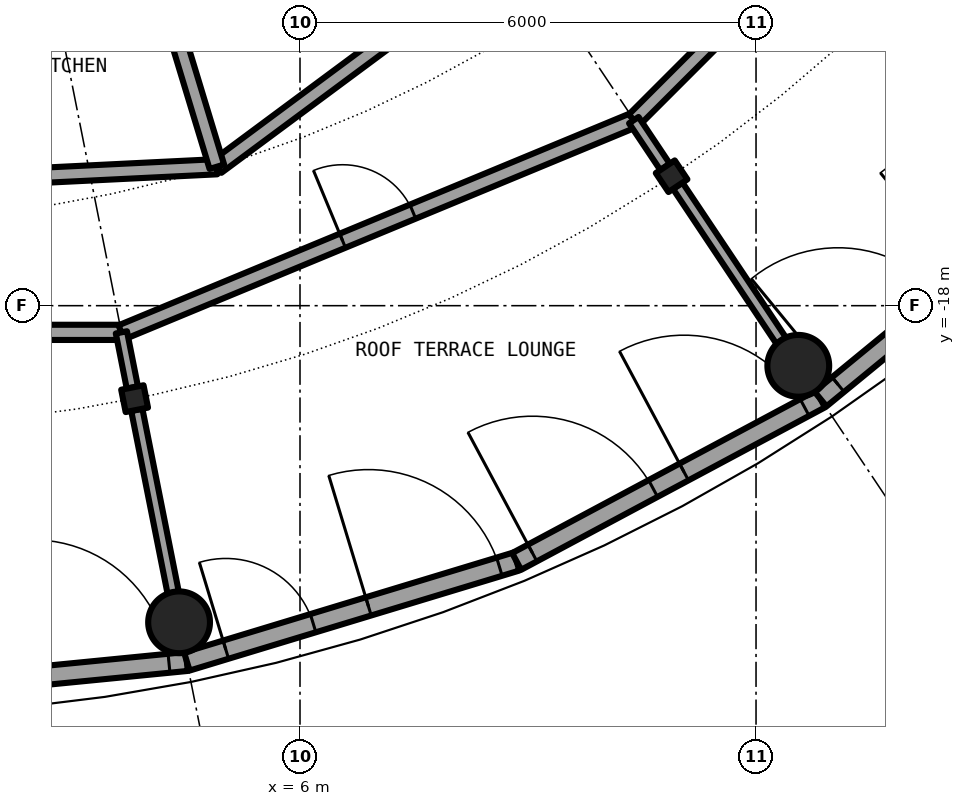
"""IFC4 building model, lengths in metres.
Left out: names, types, materials, properties, quantities, classifications, styles, units other than length and angle.
Written with IfcOpenShell. Run it as: python <this file> out.ifc"""

import sys

from ifc_helpers import new_model, si_unit, direction, frame, frame_2d, origin, origin_2d, place, context, subcontext, project, spatial, rectangle, hollow_circle, i_section, extrude, element, fill, save


model = new_model("IFC4")
c1 = context("Model", 3, precision=1e-05, world=origin(), true_north=direction((0.0, 1.0)))
c2 = subcontext(c1, "Body", "Model", "MODEL_VIEW")
j1 = project(units=[si_unit("LENGTHUNIT", "METRE"), si_unit("PLANEANGLEUNIT", "RADIAN")], contexts=[c1])
p1 = place(None, origin())
s1 = spatial("IfcSite", under=j1, at=p1, CompositionType="ELEMENT")
p2 = place(p1, origin())
s2 = spatial("IfcBuilding", under=s1, at=p2, CompositionType="ELEMENT")
p3 = place(p2, frame((0.0, 0.0, 249.3)))
s3 = spatial("IfcBuildingStorey", under=s2, at=p3, CompositionType="ELEMENT", Elevation=249.3)
for number, where, z_axis, x_axis in (
    (1, (4.409, -22.166, 0.0), (0.0, 0.0, 1.0), (1.0, 0.0, 0.0)),
    (2, (12.556, -18.791, 0.0), (0.0, 0.0, 1.0), (1.0, 0.0, 0.0)),
):
    element("IfcColumn", number, at=place(p3, frame(where, z_axis=z_axis, x_axis=x_axis)), inside=s3, PredefinedType="COLUMN", context=c2, shape_type="SweptSolid", body=[
        extrude(hollow_circle(Radius=0.406, WallThickness=0.03, at=origin_2d()), origin(), (0.0, 0.0, 1.0), 3.05),
    ])
for number, where, z_axis, x_axis in (
    (3, (3.824, -19.223, 0.0), (0.0, 0.0, 1.0), (0.195, -0.981, 0.0)),
    (4, (10.889, -16.297, 0.0), (0.0, 0.0, 1.0), (0.556, -0.831, 0.0)),
):
    element("IfcColumn", number, at=place(p3, frame(where, z_axis=z_axis, x_axis=x_axis)), inside=s3, PredefinedType="COLUMN", context=c2, shape_type="SweptSolid", body=[
        extrude(i_section(OverallWidth=0.3, OverallDepth=0.3, WebThickness=0.011, FlangeThickness=0.019, FilletRadius=0.027, at=origin_2d()), origin(), (0.0, 0.0, 1.0), 3.05),
    ])
p4 = place(p3, frame((0.0, -23.125, 0.0), z_axis=(0.0, 0.0, 1.0), x_axis=(0.995189063612, 0.097973096645, 0.0)))
e5 = element("IfcWall", 5, at=p4, inside=s3, PredefinedType="SOLIDWALL", context=c2, shape_type="SweptSolid", body=[
    extrude(rectangle(XDim=4.533, YDim=0.25, at=frame_2d((2.266, 0.0))), origin(), (0.0, 0.0, 1.0), 2.7),
])
p5 = place(p4, frame((0.236, 0.0, 0.0)))
e6 = element("IfcOpeningElement", 6, at=p5, cuts=e5, PredefinedType="OPENING", context=c2, shape_type="SweptSolid", body=[
    extrude(rectangle(XDim=1.8, YDim=2.2, at=frame_2d((0.9, 1.1))), frame((0.0, 0.135, 0.0), z_axis=(0.0, -1.0, 0.0), x_axis=(1.0, 0.0, 0.0)), (0.0, 0.0, 1.0), 0.27),
])
p6 = place(p4, frame((2.497, 0.0, 0.0)))
e7 = element("IfcOpeningElement", 7, at=p6, cuts=e5, PredefinedType="OPENING", context=c2, shape_type="SweptSolid", body=[
    extrude(rectangle(XDim=1.8, YDim=2.2, at=frame_2d((0.9, 1.1))), frame((0.0, 0.135, 0.0), z_axis=(0.0, -1.0, 0.0), x_axis=(1.0, 0.0, 0.0)), (0.0, 0.0, 1.0), 0.27),
])
p7 = place(p3, frame((4.511, -22.681, 0.0), z_axis=(0.0, 0.0, 1.0), x_axis=(0.956960982965, 0.290216603735, 0.0)))
e8 = element("IfcWall", 8, at=p7, inside=s3, PredefinedType="SOLIDWALL", context=c2, shape_type="SweptSolid", body=[
    extrude(rectangle(XDim=4.534, YDim=0.25, at=frame_2d((2.267, 0.0))), origin(), (0.0, 0.0, 1.0), 2.7),
])
p8 = place(p7, frame((0.536, 0.0, 0.0)))
e9 = element("IfcOpeningElement", 9, at=p8, cuts=e8, PredefinedType="OPENING", context=c2, shape_type="SweptSolid", body=[
    extrude(rectangle(XDim=1.2, YDim=2.2, at=frame_2d((0.6, 1.1))), frame((0.0, 0.135, 0.0), z_axis=(0.0, -1.0, 0.0), x_axis=(1.0, 0.0, 0.0)), (0.0, 0.0, 1.0), 0.27),
])
p9 = place(p7, frame((2.497, 0.0, 0.0)))
e10 = element("IfcOpeningElement", 10, at=p9, cuts=e8, PredefinedType="OPENING", context=c2, shape_type="SweptSolid", body=[
    extrude(rectangle(XDim=1.8, YDim=2.2, at=frame_2d((0.9, 1.1))), frame((0.0, 0.135, 0.0), z_axis=(0.0, -1.0, 0.0), x_axis=(1.0, 0.0, 0.0)), (0.0, 0.0, 1.0), 0.27),
])
p10 = place(p3, frame((8.85, -21.365, 0.0), z_axis=(0.0, 0.0, 1.0), x_axis=(0.881912752543, 0.471412660947, 0.0)))
e11 = element("IfcWall", 11, at=p10, inside=s3, PredefinedType="SOLIDWALL", context=c2, shape_type="SweptSolid", body=[
    extrude(rectangle(XDim=4.533, YDim=0.25, at=frame_2d((2.267, 0.0))), origin(), (0.0, 0.0, 1.0), 2.7),
])
p11 = place(p10, frame((0.236, 0.0, 0.0)))
e12 = element("IfcOpeningElement", 12, at=p11, cuts=e11, PredefinedType="OPENING", context=c2, shape_type="SweptSolid", body=[
    extrude(rectangle(XDim=1.8, YDim=2.2, at=frame_2d((0.9, 1.1))), frame((0.0, 0.135, 0.0), z_axis=(0.0, -1.0, 0.0), x_axis=(1.0, 0.0, 0.0)), (0.0, 0.0, 1.0), 0.27),
])
p12 = place(p10, frame((2.497, 0.0, 0.0)))
e13 = element("IfcOpeningElement", 13, at=p12, cuts=e11, PredefinedType="OPENING", context=c2, shape_type="SweptSolid", body=[
    extrude(rectangle(XDim=1.8, YDim=2.2, at=frame_2d((0.9, 1.1))), frame((0.0, 0.135, 0.0), z_axis=(0.0, -1.0, 0.0), x_axis=(1.0, 0.0, 0.0)), (0.0, 0.0, 1.0), 0.27),
])
p13 = place(p3, frame((12.848, -19.228, 0.0), z_axis=(0.0, 0.0, 1.0), x_axis=(0.772989395532, 0.634418942337, 0.0)))
e14 = element("IfcWall", 14, at=p13, inside=s3, PredefinedType="SOLIDWALL", context=c2, shape_type="SweptSolid", body=[
    extrude(rectangle(XDim=4.533, YDim=0.25, at=frame_2d((2.267, 0.0))), origin(), (0.0, 0.0, 1.0), 2.7),
])
p14 = place(p13, frame((0.3, 0.0, 0.0)))
e15 = element("IfcOpeningElement", 15, at=p14, cuts=e14, PredefinedType="OPENING", context=c2, shape_type="SweptSolid", body=[
    extrude(rectangle(XDim=1.8, YDim=2.2, at=frame_2d((0.9, 1.1))), frame((0.0, 0.135, 0.0), z_axis=(0.0, -1.0, 0.0), x_axis=(1.0, 0.0, 0.0)), (0.0, 0.0, 1.0), 0.27),
])
p15 = place(p13, frame((2.497, 0.0, 0.0)))
e16 = element("IfcOpeningElement", 16, at=p15, cuts=e14, PredefinedType="OPENING", context=c2, shape_type="SweptSolid", body=[
    extrude(rectangle(XDim=1.8, YDim=2.2, at=frame_2d((0.9, 1.1))), frame((0.0, 0.135, 0.0), z_axis=(0.0, -1.0, 0.0), x_axis=(1.0, 0.0, 0.0)), (0.0, 0.0, 1.0), 0.27),
])
p16 = place(p3, frame((-3.65, -18.351, 0.0), z_axis=(0.0, 0.0, 1.0), x_axis=(1.0, 0.0, 0.0)))
e17 = element("IfcWall", 17, at=p16, inside=s3, PredefinedType="PARTITIONING", context=c2, shape_type="SweptSolid", body=[
    extrude(rectangle(XDim=7.3, YDim=0.2, at=frame_2d((3.65, 0.0))), origin(), (0.0, 0.0, 1.0), 2.7),
])
p17 = place(p16, frame((3.15, 0.0, 0.0)))
e18 = element("IfcOpeningElement", 18, at=p17, cuts=e17, PredefinedType="OPENING", context=c2, shape_type="SweptSolid", body=[
    extrude(rectangle(XDim=1.0, YDim=2.3, at=frame_2d((0.5, 1.15))), frame((0.0, 0.11, 0.0), z_axis=(0.0, -1.0, 0.0), x_axis=(1.0, 0.0, 0.0)), (0.0, 0.0, 1.0), 0.22),
])
p18 = place(p3, frame((3.65, -18.351, 0.0), z_axis=(0.0, 0.0, 1.0), x_axis=(0.923866436038, 0.382715048518, 0.0)))
e19 = element("IfcWall", 19, at=p18, inside=s3, PredefinedType="PARTITIONING", context=c2, shape_type="SweptSolid", body=[
    extrude(rectangle(XDim=7.301, YDim=0.2, at=frame_2d((3.65, 0.0))), origin(), (0.0, 0.0, 1.0), 2.7),
])
p19 = place(p18, frame((3.15, 0.0, 0.0)))
e20 = element("IfcOpeningElement", 20, at=p19, cuts=e19, PredefinedType="OPENING", context=c2, shape_type="SweptSolid", body=[
    extrude(rectangle(XDim=1.0, YDim=2.3, at=frame_2d((0.5, 1.15))), frame((0.0, 0.11, 0.0), z_axis=(0.0, -1.0, 0.0), x_axis=(1.0, 0.0, 0.0)), (0.0, 0.0, 1.0), 0.22),
])
p20 = place(p3, frame((10.395, -15.557, 0.0), z_axis=(0.0, 0.0, 1.0), x_axis=(0.707106781187, 0.707106781187, 0.0)))
e21 = element("IfcWall", 21, at=p20, inside=s3, PredefinedType="PARTITIONING", context=c2, shape_type="SweptSolid", body=[
    extrude(rectangle(XDim=7.3, YDim=0.2, at=frame_2d((3.65, 0.0))), origin(), (0.0, 0.0, 1.0), 2.7),
])
p21 = place(p20, frame((3.15, 0.0, 0.0)))
e22 = element("IfcOpeningElement", 22, at=p21, cuts=e21, PredefinedType="OPENING", context=c2, shape_type="SweptSolid", body=[
    extrude(rectangle(XDim=1.0, YDim=2.3, at=frame_2d((0.5, 1.15))), frame((0.0, 0.11, 0.0), z_axis=(0.0, -1.0, 0.0), x_axis=(1.0, 0.0, 0.0)), (0.0, 0.0, 1.0), 0.22),
])
p22 = place(p3, frame((-3.297, -16.575, 0.0), z_axis=(0.0, 0.0, 1.0), x_axis=(0.998796706656, 0.0490422142, 0.0)))
e23 = element("IfcWall", 23, at=p22, inside=s3, PredefinedType="PARTITIONING", context=c2, shape_type="SweptSolid", body=[
    extrude(rectangle(XDim=8.214, YDim=0.2, at=frame_2d((4.107, 0.0))), origin(), (0.0, 0.0, 1.0), 2.7),
])
p23 = place(p22, frame((3.614, 0.0, 0.0)))
e24 = element("IfcOpeningElement", 24, at=p23, cuts=e23, PredefinedType="OPENING", context=c2, shape_type="SweptSolid", body=[
    extrude(rectangle(XDim=1.0, YDim=2.3, at=frame_2d((0.5, 1.15))), frame((0.0, 0.11, 0.0), z_axis=(0.0, -1.0, 0.0), x_axis=(1.0, 0.0, 0.0)), (0.0, 0.0, 1.0), 0.22),
])
p24 = place(p3, frame((4.906, -16.172, 0.0), z_axis=(0.0, 0.0, 1.0), x_axis=(0.803204584823, 0.59570327758, 0.0)))
e25 = element("IfcWall", 25, at=p24, inside=s3, PredefinedType="PARTITIONING", context=c2, shape_type="SweptSolid", body=[
    extrude(rectangle(XDim=11.387, YDim=0.2, at=frame_2d((5.693, 0.0))), origin(), (0.0, 0.0, 1.0), 2.7),
])
p25 = place(p24, frame((4.38, 0.0, 0.0)))
e26 = element("IfcOpeningElement", 26, at=p25, cuts=e25, PredefinedType="OPENING", context=c2, shape_type="SweptSolid", body=[
    extrude(rectangle(XDim=1.0, YDim=2.3, at=frame_2d((0.5, 1.15))), frame((0.0, 0.11, 0.0), z_axis=(0.0, -1.0, 0.0), x_axis=(1.0, 0.0, 0.0)), (0.0, 0.0, 1.0), 0.22),
])
p26 = place(p3, frame((2.24, -7.388, 0.0), z_axis=(0.0, 0.0, 1.0), x_axis=(0.290420725025, -0.956899055531, 0.0)))
e27 = element("IfcWall", 27, at=p26, inside=s3, PredefinedType="PARTITIONING", context=c2, shape_type="SweptSolid", body=[
    extrude(rectangle(XDim=9.18, YDim=0.2, at=frame_2d((4.59, 0.0))), origin(), (0.0, 0.0, 1.0), 2.7),
])
p27 = place(p3, frame((3.65, -18.351, 0.0), z_axis=(0.0, 0.0, 1.0), x_axis=(0.194908923467, -0.98082134538, 0.0)))
e28 = element("IfcWall", 28, at=p27, inside=s3, PredefinedType="PARTITIONING", context=c2, shape_type="SweptSolid", body=[
    extrude(rectangle(XDim=0.739, YDim=0.15, at=frame_2d((0.37, 0.0))), origin(), (0.0, 0.0, 1.0), 2.7),
])
p28 = place(p3, frame((3.853, -19.371, 0.0), z_axis=(0.0, 0.0, 1.0), x_axis=(0.195043256877, -0.980794641068, 0.0)))
e29 = element("IfcWall", 29, at=p28, inside=s3, PredefinedType="PARTITIONING", context=c2, shape_type="SweptSolid", body=[
    extrude(rectangle(XDim=2.451, YDim=0.15, at=frame_2d((1.226, 0.0))), origin(), (0.0, 0.0, 1.0), 2.7),
])
p29 = place(p3, frame((10.392, -15.559, 0.0), z_axis=(0.0, 0.0, 1.0), x_axis=(0.555537830231, -0.831491262241, 0.0)))
e30 = element("IfcWall", 30, at=p29, inside=s3, PredefinedType="PARTITIONING", context=c2, shape_type="SweptSolid", body=[
    extrude(rectangle(XDim=0.74, YDim=0.15, at=frame_2d((0.37, 0.0))), origin(), (0.0, 0.0, 1.0), 2.7),
])
p30 = place(p3, frame((10.97, -16.423, 0.0), z_axis=(0.0, 0.0, 1.0), x_axis=(0.555504160879, -0.831513756498, 0.0)))
e31 = element("IfcWall", 31, at=p30, inside=s3, PredefinedType="PARTITIONING", context=c2, shape_type="SweptSolid", body=[
    extrude(rectangle(XDim=2.452, YDim=0.15, at=frame_2d((1.226, 0.0))), origin(), (0.0, 0.0, 1.0), 2.7),
])
p31 = place(p6, origin())
e32 = element("IfcDoor", 32, at=p31, inside=s3, OperationType="SINGLE_SWING_LEFT", PredefinedType="DOOR", context=c2, shape_type="SweptSolid", body=[
    extrude(rectangle(XDim=1.8, YDim=2.2, at=frame_2d((0.9, 1.1))), frame((0.0, 0.025, 0.0), z_axis=(0.0, -1.0, 0.0), x_axis=(1.0, 0.0, 0.0)), (0.0, 0.0, 1.0), 0.05),
])
fill(e7, e32)
p32 = place(p8, origin())
e33 = element("IfcDoor", 33, at=p32, inside=s3, OperationType="SINGLE_SWING_LEFT", PredefinedType="DOOR", context=c2, shape_type="SweptSolid", body=[
    extrude(rectangle(XDim=1.2, YDim=2.2, at=frame_2d((0.6, 1.1))), frame((0.0, 0.025, 0.0), z_axis=(0.0, -1.0, 0.0), x_axis=(1.0, 0.0, 0.0)), (0.0, 0.0, 1.0), 0.05),
])
fill(e9, e33)
p33 = place(p9, origin())
e34 = element("IfcDoor", 34, at=p33, inside=s3, OperationType="SINGLE_SWING_LEFT", PredefinedType="DOOR", context=c2, shape_type="SweptSolid", body=[
    extrude(rectangle(XDim=1.8, YDim=2.2, at=frame_2d((0.9, 1.1))), frame((0.0, 0.025, 0.0), z_axis=(0.0, -1.0, 0.0), x_axis=(1.0, 0.0, 0.0)), (0.0, 0.0, 1.0), 0.05),
])
fill(e10, e34)
p34 = place(p11, origin())
e35 = element("IfcDoor", 35, at=p34, inside=s3, OperationType="SINGLE_SWING_LEFT", PredefinedType="DOOR", context=c2, shape_type="SweptSolid", body=[
    extrude(rectangle(XDim=1.8, YDim=2.2, at=frame_2d((0.9, 1.1))), frame((0.0, 0.025, 0.0), z_axis=(0.0, -1.0, 0.0), x_axis=(1.0, 0.0, 0.0)), (0.0, 0.0, 1.0), 0.05),
])
fill(e12, e35)
p35 = place(p12, origin())
e36 = element("IfcDoor", 36, at=p35, inside=s3, OperationType="SINGLE_SWING_LEFT", PredefinedType="DOOR", context=c2, shape_type="SweptSolid", body=[
    extrude(rectangle(XDim=1.8, YDim=2.2, at=frame_2d((0.9, 1.1))), frame((0.0, 0.025, 0.0), z_axis=(0.0, -1.0, 0.0), x_axis=(1.0, 0.0, 0.0)), (0.0, 0.0, 1.0), 0.05),
])
fill(e13, e36)
p36 = place(p14, origin())
e37 = element("IfcDoor", 37, at=p36, inside=s3, OperationType="SINGLE_SWING_LEFT", PredefinedType="DOOR", context=c2, shape_type="SweptSolid", body=[
    extrude(rectangle(XDim=1.8, YDim=2.2, at=frame_2d((0.9, 1.1))), frame((0.0, 0.025, 0.0), z_axis=(0.0, -1.0, 0.0), x_axis=(1.0, 0.0, 0.0)), (0.0, 0.0, 1.0), 0.05),
])
fill(e15, e37)
p37 = place(p19, origin())
e38 = element("IfcDoor", 38, at=p37, inside=s3, OperationType="SINGLE_SWING_LEFT", PredefinedType="DOOR", context=c2, shape_type="SweptSolid", body=[
    extrude(rectangle(XDim=1.0, YDim=2.3, at=frame_2d((0.5, 1.15))), frame((0.0, 0.025, 0.0), z_axis=(0.0, -1.0, 0.0), x_axis=(1.0, 0.0, 0.0)), (0.0, 0.0, 1.0), 0.05),
])
fill(e20, e38)
save(model, sys.argv[1])
